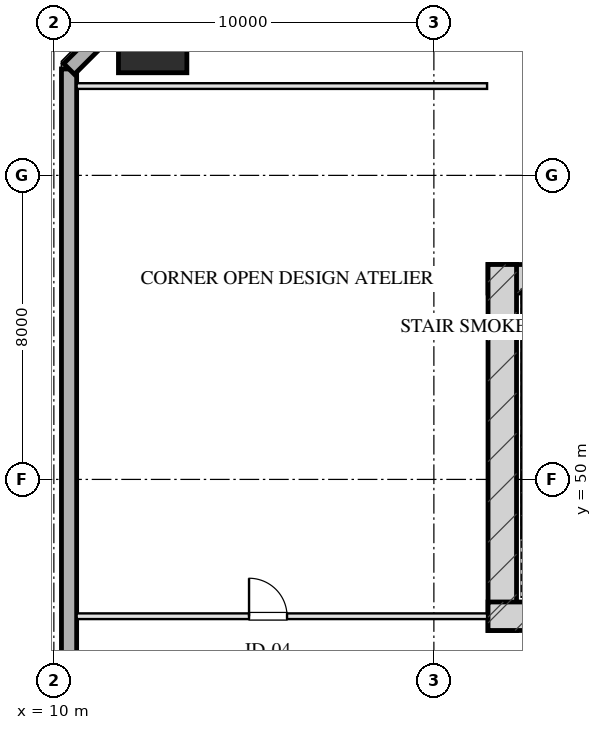
"""IFC4 building model, lengths in metres.
Left out: names, types, materials, properties, quantities, classifications, styles, units other than length and angle.
Written with IfcOpenShell. Run it as: python <this file> out.ifc"""

import sys

from ifc_helpers import new_model, si_unit, direction, frame, frame_2d, origin, origin_2d, place, context, subcontext, project, spatial, rectangle, hollow_rectangle, extrude, element, fill, save


model = new_model("IFC4")
c1 = context("Model", 3, precision=1e-05, world=origin(), true_north=direction((0.0, 1.0)))
c2 = subcontext(c1, "Body", "Model", "MODEL_VIEW")
j1 = project(units=[si_unit("LENGTHUNIT", "METRE"), si_unit("PLANEANGLEUNIT", "RADIAN")], contexts=[c1])
p1 = place(None, origin())
s1 = spatial("IfcSite", under=j1, at=p1, CompositionType="ELEMENT")
p2 = place(p1, origin())
s2 = spatial("IfcBuilding", under=s1, at=p2, CompositionType="ELEMENT")
p3 = place(p2, frame((0.0, 0.0, 74.75)))
s3 = spatial("IfcBuildingStorey", under=s2, at=p3, CompositionType="ELEMENT", Elevation=74.75)
p4 = place(p3, frame((21.425, 55.28, 0.0), z_axis=(0.0, 0.0, 1.0), x_axis=(1.0, 0.0, 0.0)))
e1 = element("IfcWall", 1, at=p4, inside=s3, PredefinedType="SHEAR", context=c2, shape_type="SweptSolid", body=[
    extrude(rectangle(XDim=17.15, YDim=0.75, at=frame_2d((8.575, 0.0))), origin(), (0.0, 0.0, 1.0), 3.45),
])
p5 = place(p3, frame((21.8, 46.025, 0.0), z_axis=(0.0, 0.0, 1.0), x_axis=(0.0, 1.0, 0.0)))
e2 = element("IfcWall", 2, at=p5, inside=s3, PredefinedType="SHEAR", context=c2, shape_type="SweptSolid", body=[
    extrude(rectangle(XDim=9.63, YDim=0.75, at=frame_2d((4.815, 0.0))), origin(), (0.0, 0.0, 1.0), 3.45),
])
p6 = place(p3, frame((21.425, 46.4, 0.0), z_axis=(0.0, 0.0, 1.0), x_axis=(1.0, 0.0, 0.0)))
e3 = element("IfcWall", 3, at=p6, inside=s3, PredefinedType="SHEAR", context=c2, shape_type="SweptSolid", body=[
    extrude(rectangle(XDim=4.295, YDim=0.75, at=frame_2d((2.147, 0.0))), origin(), (0.0, 0.0, 1.0), 3.45),
])
p7 = place(p3, frame((12.6, 61.6, 0.0), z_axis=(0.0, 0.0, 1.0), x_axis=(1.0, 0.0, 0.0)))
e4 = element("IfcColumn", 4, at=p7, inside=s3, PredefinedType="COLUMN", context=c2, shape_type="SweptSolid", body=[
    extrude(hollow_rectangle(XDim=1.8, YDim=1.8, WallThickness=0.06, at=origin_2d()), origin(), (0.0, 0.0, 1.0), 3.451),
])
p8 = place(p3, frame((10.4, 7.2, 0.0), z_axis=(0.0, 0.0, 1.0), x_axis=(0.0, 1.0, 0.0)))
e5 = element("IfcWall", 5, at=p8, inside=s3, PredefinedType="SOLIDWALL", context=c2, shape_type="SweptSolid", body=[
    extrude(rectangle(XDim=53.6, YDim=0.4, at=frame_2d((26.8, 0.0))), origin(), (0.0, 0.0, 1.0), 2.61),
])
p9 = place(p8, frame((19.15, 0.0, 0.75)))
e6 = element("IfcOpeningElement", 6, at=p9, cuts=e5, PredefinedType="OPENING", context=c2, shape_type="SweptSolid", body=[
    extrude(rectangle(XDim=2.5, YDim=1.46, at=frame_2d((1.25, 0.73))), frame((0.0, 0.21, 0.0), z_axis=(0.0, -1.0, 0.0), x_axis=(1.0, 0.0, 0.0)), (0.0, 0.0, 1.0), 0.42),
])
p10 = place(p8, frame((28.15, 0.0, 0.75)))
e7 = element("IfcOpeningElement", 7, at=p10, cuts=e5, PredefinedType="OPENING", context=c2, shape_type="SweptSolid", body=[
    extrude(rectangle(XDim=2.5, YDim=1.46, at=frame_2d((1.25, 0.73))), frame((0.0, 0.21, 0.0), z_axis=(0.0, -1.0, 0.0), x_axis=(1.0, 0.0, 0.0)), (0.0, 0.0, 1.0), 0.42),
])
p11 = place(p8, frame((31.95, 0.0, 0.75)))
e8 = element("IfcOpeningElement", 8, at=p11, cuts=e5, PredefinedType="OPENING", context=c2, shape_type="SweptSolid", body=[
    extrude(rectangle(XDim=2.5, YDim=1.46, at=frame_2d((1.25, 0.73))), frame((0.0, 0.21, 0.0), z_axis=(0.0, -1.0, 0.0), x_axis=(1.0, 0.0, 0.0)), (0.0, 0.0, 1.0), 0.42),
])
p12 = place(p3, frame((10.4, 60.8, 0.0), z_axis=(0.0, 0.0, 1.0), x_axis=(0.707106781187, 0.707106781187, 0.0)))
e9 = element("IfcWall", 9, at=p12, inside=s3, PredefinedType="SOLIDWALL", context=c2, shape_type="SweptSolid", body=[
    extrude(rectangle(XDim=4.243, YDim=0.4, at=frame_2d((2.121, 0.0))), origin(), (0.0, 0.0, 1.0), 2.61),
])
p13 = place(p3, frame((10.6, 60.35, 0.0), z_axis=(0.0, 0.0, 1.0), x_axis=(1.0, 0.0, 0.0)))
e10 = element("IfcWall", 10, at=p13, inside=s3, PredefinedType="PARTITIONING", context=c2, shape_type="SweptSolid", body=[
    extrude(rectangle(XDim=10.8, YDim=0.15, at=frame_2d((5.4, 0.0))), origin(), (0.0, 0.0, 1.0), 3.175),
])
p14 = place(p3, frame((10.6, 46.4, 0.0), z_axis=(0.0, 0.0, 1.0), x_axis=(1.0, 0.0, 0.0)))
e11 = element("IfcWall", 11, at=p14, inside=s3, PredefinedType="PARTITIONING", context=c2, shape_type="SweptSolid", body=[
    extrude(rectangle(XDim=10.8, YDim=0.15, at=frame_2d((5.4, 0.0))), origin(), (0.0, 0.0, 1.0), 3.175),
])
p15 = place(p14, frame((4.536, 0.0, 0.0)))
e12 = element("IfcOpeningElement", 12, at=p15, cuts=e11, PredefinedType="OPENING", context=c2, shape_type="SweptSolid", body=[
    extrude(rectangle(XDim=1.0, YDim=2.05, at=frame_2d((0.5, 1.025))), frame((0.0, 0.085, 0.0), z_axis=(0.0, -1.0, 0.0), x_axis=(1.0, 0.0, 0.0)), (0.0, 0.0, 1.0), 0.17),
])
p16 = place(p15, origin())
e13 = element("IfcDoor", 13, at=p16, inside=s3, OperationType="SINGLE_SWING_LEFT", PredefinedType="DOOR", context=c2, shape_type="SweptSolid", body=[
    extrude(rectangle(XDim=1.0, YDim=2.05, at=frame_2d((0.5, 1.025))), frame((0.0, 0.025, 0.0), z_axis=(0.0, -1.0, 0.0), x_axis=(1.0, 0.0, 0.0)), (0.0, 0.0, 1.0), 0.05),
])
fill(e12, e13)
save(model, sys.argv[1])
